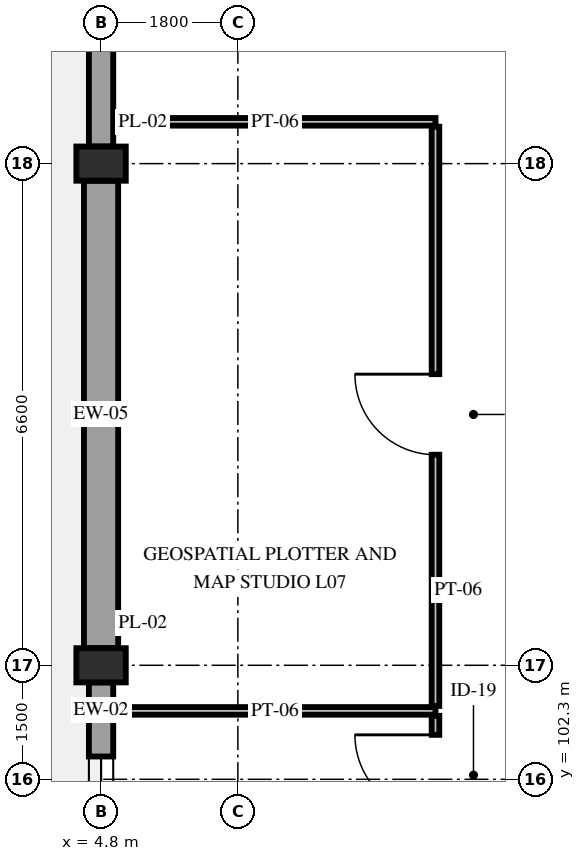
"""IFC4 building model, lengths in metres.
Left out: names, types, materials, properties, quantities, classifications, styles, units other than length and angle.
Written with IfcOpenShell. Run it as: python <this file> out.ifc"""

import sys

from ifc_helpers import new_model, si_unit, direction, frame, frame_2d, origin, origin_2d, place, context, subcontext, project, spatial, rectangle, extrude, element, fill, save


model = new_model("IFC4")
c1 = context("Model", 3, precision=1e-05, world=origin(), true_north=direction((0.0, 1.0)))
c2 = subcontext(c1, "Body", "Model", "MODEL_VIEW")
j1 = project(units=[si_unit("LENGTHUNIT", "METRE"), si_unit("PLANEANGLEUNIT", "RADIAN")], contexts=[c1])
p1 = place(None, origin())
s1 = spatial("IfcSite", under=j1, at=p1, CompositionType="ELEMENT")
p2 = place(p1, origin())
s2 = spatial("IfcBuilding", under=s1, at=p2, CompositionType="ELEMENT")
p3 = place(p2, frame((0.0, 0.0, 34.2)))
s3 = spatial("IfcBuildingStorey", under=s2, at=p3, CompositionType="ELEMENT", Elevation=34.2)
for number, where, z_axis, x_axis in (
    (1, (4.8, 103.8, 0.0), (0.0, 0.0, 1.0), (0.0, 1.0, 0.0)),
    (2, (4.8, 110.4, 0.0), (0.0, 0.0, 1.0), (0.0, 1.0, 0.0)),
):
    element("IfcColumn", number, at=place(p3, frame(where, z_axis=z_axis, x_axis=x_axis)), inside=s3, PredefinedType="PILASTER", context=c2, shape_type="SweptSolid", body=[
        extrude(rectangle(XDim=0.45, YDim=0.65, at=origin_2d()), origin(), (0.0, 0.0, 1.0), 4.2),
    ])
p4 = place(p3, frame((4.8, 99.225, 0.0), z_axis=(0.0, 0.0, 1.0), x_axis=(0.0, 1.0, 0.0)))
e3 = element("IfcWall", 3, at=p4, inside=s3, PredefinedType="STANDARD", context=c2, shape_type="SweptSolid", body=[
    extrude(rectangle(XDim=4.35, YDim=0.32, at=frame_2d((2.175, 0.0))), origin(), (0.0, 0.0, 1.0), 3.23),
])
p5 = place(p4, frame((0.975, 0.0, 0.65)))
e4 = element("IfcOpeningElement", 4, at=p5, cuts=e3, PredefinedType="OPENING", context=c2, shape_type="SweptSolid", body=[
    extrude(rectangle(XDim=2.4, YDim=2.24, at=frame_2d((1.2, 1.12))), frame((0.0, 0.175, 0.0), z_axis=(0.0, -1.0, 0.0), x_axis=(1.0, 0.0, 0.0)), (0.0, 0.0, 1.0), 0.35),
])
p6 = place(p3, frame((4.8, 104.025, 0.0), z_axis=(0.0, 0.0, 1.0), x_axis=(0.0, 1.0, 0.0)))
e5 = element("IfcWall", 5, at=p6, inside=s3, PredefinedType="SOLIDWALL", context=c2, shape_type="SweptSolid", body=[
    extrude(rectangle(XDim=6.15, YDim=0.45, at=frame_2d((3.075, 0.0))), origin(), (0.0, 0.0, 1.0), 3.23),
])
p7 = place(p3, frame((4.8, 110.625, 0.0), z_axis=(0.0, 0.0, 1.0), x_axis=(0.0, 1.0, 0.0)))
e6 = element("IfcWall", 6, at=p7, inside=s3, PredefinedType="STANDARD", context=c2, shape_type="SweptSolid", body=[
    extrude(rectangle(XDim=6.45, YDim=0.32, at=frame_2d((3.225, 0.0))), origin(), (0.0, 0.0, 1.0), 3.23),
])
p8 = place(p7, frame((2.35, 0.0, 0.0)))
e7 = element("IfcOpeningElement", 7, at=p8, cuts=e6, PredefinedType="OPENING", context=c2, shape_type="SweptSolid", body=[
    extrude(rectangle(XDim=1.75, YDim=2.3, at=frame_2d((0.875, 1.15))), frame((0.0, 0.175, 0.0), z_axis=(0.0, -1.0, 0.0), x_axis=(1.0, 0.0, 0.0)), (0.0, 0.0, 1.0), 0.35),
])
for number, where, z_axis, x_axis in (
    (8, (4.975, 103.2, 0.0), (0.0, 0.0, 1.0), (1.0, 0.0, 0.0)),
    (9, (4.975, 110.95, 0.0), (0.0, 0.0, 1.0), (1.0, 0.0, 0.0)),
):
    element("IfcWall", number, at=place(p3, frame(where, z_axis=z_axis, x_axis=x_axis)), inside=s3, PredefinedType="PARTITIONING", context=c2, shape_type="SweptSolid", body=[
        extrude(rectangle(XDim=4.225, YDim=0.1, at=frame_2d((2.112, 0.0))), origin(), (0.0, 0.0, 1.0), 3.48),
    ])
p9 = place(p3, frame((9.2, 103.265, 0.0), z_axis=(0.0, 0.0, 1.0), x_axis=(0.0, 1.0, 0.0)))
e10 = element("IfcWall", 10, at=p9, inside=s3, PredefinedType="PARTITIONING", context=c2, shape_type="SweptSolid", body=[
    extrude(rectangle(XDim=7.62, YDim=0.1, at=frame_2d((3.81, 0.0))), origin(), (0.0, 0.0, 1.0), 3.23),
])
p10 = place(p9, frame((3.305, 0.0, 0.0)))
e11 = element("IfcOpeningElement", 11, at=p10, cuts=e10, PredefinedType="OPENING", context=c2, shape_type="SweptSolid", body=[
    extrude(rectangle(XDim=1.06, YDim=2.2, at=frame_2d((0.53, 1.1))), frame((0.0, 0.065, 0.0), z_axis=(0.0, -1.0, 0.0), x_axis=(1.0, 0.0, 0.0)), (0.0, 0.0, 1.0), 0.13),
])
p11 = place(p3, frame((9.2, 99.04, 0.0), z_axis=(0.0, 0.0, 1.0), x_axis=(0.0, 1.0, 0.0)))
e12 = element("IfcWall", 12, at=p11, inside=s3, PredefinedType="PARTITIONING", context=c2, shape_type="SweptSolid", body=[
    extrude(rectangle(XDim=4.095, YDim=0.1, at=frame_2d((2.047, 0.0))), origin(), (0.0, 0.0, 1.0), 3.33),
])
p12 = place(p11, frame((2.785, 0.0, 0.0)))
e13 = element("IfcOpeningElement", 13, at=p12, cuts=e12, PredefinedType="OPENING", context=c2, shape_type="SweptSolid", body=[
    extrude(rectangle(XDim=1.06, YDim=2.2, at=frame_2d((0.53, 1.1))), frame((0.0, 0.065, 0.0), z_axis=(0.0, -1.0, 0.0), x_axis=(1.0, 0.0, 0.0)), (0.0, 0.0, 1.0), 0.13),
])
p13 = place(p5, origin())
e14 = element("IfcWindow", 14, at=p13, inside=s3, PartitioningType="DOUBLE_PANEL_VERTICAL", PredefinedType="WINDOW", context=c2, shape_type="SweptSolid", body=[
    extrude(rectangle(XDim=2.4, YDim=2.24, at=frame_2d((1.2, 1.12))), frame((0.0, 0.03, 0.0), z_axis=(0.0, -1.0, 0.0), x_axis=(1.0, 0.0, 0.0)), (0.0, 0.0, 1.0), 0.06),
])
fill(e4, e14)
p14 = place(p10, origin())
e15 = element("IfcDoor", 15, at=p14, inside=s3, OperationType="SINGLE_SWING_RIGHT", PredefinedType="DOOR", context=c2, shape_type="SweptSolid", body=[
    extrude(rectangle(XDim=1.06, YDim=2.2, at=frame_2d((0.53, 1.1))), frame((0.0, 0.025, 0.0), z_axis=(0.0, -1.0, 0.0), x_axis=(1.0, 0.0, 0.0)), (0.0, 0.0, 1.0), 0.05),
])
fill(e11, e15)
p15 = place(p12, origin())
e16 = element("IfcDoor", 16, at=p15, inside=s3, OperationType="SINGLE_SWING_RIGHT", PredefinedType="DOOR", context=c2, shape_type="SweptSolid", body=[
    extrude(rectangle(XDim=1.06, YDim=2.2, at=frame_2d((0.53, 1.1))), frame((0.0, 0.025, 0.0), z_axis=(0.0, -1.0, 0.0), x_axis=(1.0, 0.0, 0.0)), (0.0, 0.0, 1.0), 0.05),
])
fill(e13, e16)
save(model, sys.argv[1])
